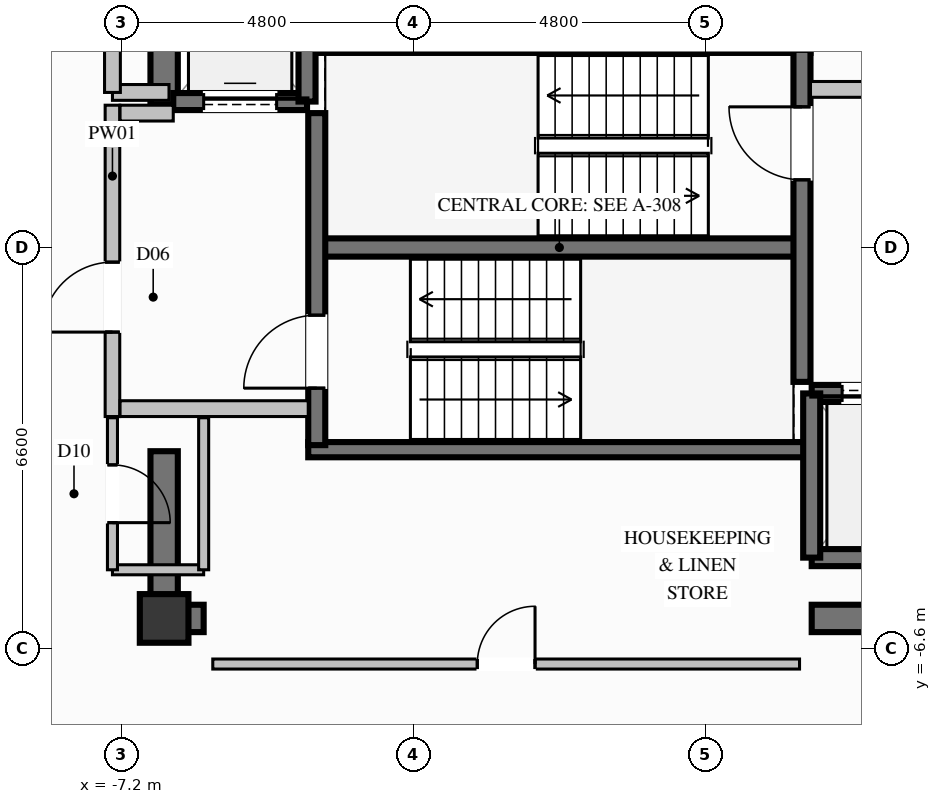
"""IFC4 building model, lengths in metres.
Left out: names, types, materials, properties, quantities, classifications, styles, units other than length and angle.
Written with IfcOpenShell. Run it as: python <this file> out.ifc"""

import sys

from ifc_helpers import new_model, si_unit, direction, frame, frame_2d, origin, origin_2d, place, context, subcontext, project, spatial, rectangle, extrude, element, fill, save


model = new_model("IFC4")
c1 = context("Model", 3, precision=1e-05, world=origin(), true_north=direction((0.0, 1.0)))
c2 = subcontext(c1, "Body", "Model", "MODEL_VIEW")
j1 = project(units=[si_unit("LENGTHUNIT", "METRE"), si_unit("PLANEANGLEUNIT", "RADIAN")], contexts=[c1])
p1 = place(None, origin())
s1 = spatial("IfcSite", under=j1, at=p1, CompositionType="ELEMENT")
p2 = place(p1, origin())
s2 = spatial("IfcBuilding", under=s1, at=p2, CompositionType="ELEMENT")
p3 = place(p2, frame((0.0, 0.0, 270.6)))
s3 = spatial("IfcBuildingStorey", under=s2, at=p3, CompositionType="ELEMENT", Elevation=270.6)
p4 = place(p3, frame((-6.5, -6.1, 0.0), z_axis=(0.0, 0.0, 1.0), x_axis=(1.0, 0.0, 0.0)))
e1 = element("IfcColumn", 1, at=p4, inside=s3, PredefinedType="COLUMN", context=c2, shape_type="SweptSolid", body=[
    extrude(rectangle(XDim=0.8, YDim=0.8, at=origin_2d()), origin(), (0.0, 0.0, 1.0), 3.8),
])
p5 = place(p3, frame((-3.99, 0.0, 0.0), z_axis=(0.0, 0.0, 1.0), x_axis=(1.0, 0.0, 0.0)))
e2 = element("IfcWall", 2, at=p5, inside=s3, PredefinedType="SHEAR", context=c2, shape_type="SweptSolid", body=[
    extrude(rectangle(XDim=7.98, YDim=0.3, at=frame_2d((3.99, 0.0))), origin(), (0.0, 0.0, 1.0), 3.8),
])
for number, where, z_axis, x_axis in (
    (3, (-4.13, -3.325, 0.0), (0.0, 0.0, 1.0), (1.0, 0.0, 0.0)),
    (4, (-4.13, 3.325, 0.0), (0.0, 0.0, 1.0), (1.0, 0.0, 0.0)),
):
    element("IfcWall", number, at=place(p3, frame(where, z_axis=z_axis, x_axis=x_axis)), inside=s3, PredefinedType="SOLIDWALL", context=c2, shape_type="SweptSolid", body=[
        extrude(rectangle(XDim=8.26, YDim=0.25, at=frame_2d((4.13, 0.0))), origin(), (0.0, 0.0, 1.0), 3.8),
    ])
p6 = place(p3, frame((-6.275, -6.1, 0.0), z_axis=(0.0, 0.0, 1.0), x_axis=(1.0, 0.0, 0.0)))
e5 = element("IfcWall", 5, at=p6, inside=s3, PredefinedType="SHEAR", context=c2, shape_type="SweptSolid", body=[
    extrude(rectangle(XDim=0.425, YDim=0.45, at=frame_2d((0.212, 0.0))), origin(), (0.0, 0.0, 1.0), 3.8),
])
p7 = place(p3, frame((4.15, -6.1, 0.0), z_axis=(0.0, 0.0, 1.0), x_axis=(1.0, 0.0, 0.0)))
e6 = element("IfcWall", 6, at=p7, inside=s3, PredefinedType="SHEAR", context=c2, shape_type="SweptSolid", body=[
    extrude(rectangle(XDim=2.125, YDim=0.45, at=frame_2d((1.062, 0.0))), origin(), (0.0, 0.0, 1.0), 3.8),
])
p8 = place(p3, frame((-6.5, 2.35, 0.0), z_axis=(0.0, 0.0, 1.0), x_axis=(0.0, 1.0, 0.0)))
e7 = element("IfcWall", 7, at=p8, inside=s3, PredefinedType="SHEAR", context=c2, shape_type="SweptSolid", body=[
    extrude(rectangle(XDim=3.975, YDim=0.45, at=frame_2d((1.987, 0.0))), origin(), (0.0, 0.0, 1.0), 3.8),
])
p9 = place(p3, frame((-6.5, -6.325, 0.0), z_axis=(0.0, 0.0, 1.0), x_axis=(0.0, 1.0, 0.0)))
e8 = element("IfcWall", 8, at=p9, inside=s3, PredefinedType="SHEAR", context=c2, shape_type="SweptSolid", body=[
    extrude(rectangle(XDim=2.975, YDim=0.45, at=frame_2d((1.487, 0.0))), origin(), (0.0, 0.0, 1.0), 3.8),
])
p10 = place(p3, frame((-6.35, 2.4, 0.0), z_axis=(0.0, 0.0, 1.0), x_axis=(1.0, 0.0, 0.0)))
e9 = element("IfcWall", 9, at=p10, inside=s3, PredefinedType="SOLIDWALL", context=c2, shape_type="SweptSolid", body=[
    extrude(rectangle(XDim=2.2, YDim=0.28, at=frame_2d((1.1, 0.0))), origin(), (0.0, 0.0, 1.0), 3.57),
])
p11 = place(p10, frame((0.5, 0.0, 0.0)))
e10 = element("IfcOpeningElement", 10, at=p11, cuts=e9, PredefinedType="OPENING", context=c2, shape_type="SweptSolid", body=[
    extrude(rectangle(XDim=1.2, YDim=2.2, at=frame_2d((0.6, 1.1))), frame((0.0, 0.15, 0.0), z_axis=(0.0, -1.0, 0.0), x_axis=(1.0, 0.0, 0.0)), (0.0, 0.0, 1.0), 0.3),
])
p12 = place(p3, frame((-4.15, 2.4, 0.0), z_axis=(0.0, 0.0, 1.0), x_axis=(0.0, 1.0, 0.0)))
e11 = element("IfcWall", 11, at=p12, inside=s3, PredefinedType="SOLIDWALL", context=c2, shape_type="SweptSolid", body=[
    extrude(rectangle(XDim=2.7, YDim=0.28, at=frame_2d((1.35, 0.0))), origin(), (0.0, 0.0, 1.0), 3.57),
])
p13 = place(p3, frame((4.15, -5.1, 0.0), z_axis=(0.0, 0.0, 1.0), x_axis=(1.0, 0.0, 0.0)))
e12 = element("IfcWall", 12, at=p13, inside=s3, PredefinedType="SOLIDWALL", context=c2, shape_type="SweptSolid", body=[
    extrude(rectangle(XDim=2.2, YDim=0.28, at=frame_2d((1.1, 0.0))), origin(), (0.0, 0.0, 1.0), 3.57),
])
p14 = place(p3, frame((6.35, -2.4, 0.0), z_axis=(0.0, 0.0, 1.0), x_axis=(-1.0, 0.0, 0.0)))
e13 = element("IfcWall", 13, at=p14, inside=s3, PredefinedType="SOLIDWALL", context=c2, shape_type="SweptSolid", body=[
    extrude(rectangle(XDim=2.2, YDim=0.28, at=frame_2d((1.1, 0.0))), origin(), (0.0, 0.0, 1.0), 3.57),
])
p15 = place(p14, frame((0.5, 0.0, 0.0)))
e14 = element("IfcOpeningElement", 14, at=p15, cuts=e13, PredefinedType="OPENING", context=c2, shape_type="SweptSolid", body=[
    extrude(rectangle(XDim=1.2, YDim=2.2, at=frame_2d((0.6, 1.1))), frame((0.0, 0.15, 0.0), z_axis=(0.0, -1.0, 0.0), x_axis=(1.0, 0.0, 0.0)), (0.0, 0.0, 1.0), 0.3),
])
p16 = place(p3, frame((4.15, -2.4, 0.0), z_axis=(0.0, 0.0, 1.0), x_axis=(0.0, -1.0, 0.0)))
e15 = element("IfcWall", 15, at=p16, inside=s3, PredefinedType="SOLIDWALL", context=c2, shape_type="SweptSolid", body=[
    extrude(rectangle(XDim=2.7, YDim=0.28, at=frame_2d((1.35, 0.0))), origin(), (0.0, 0.0, 1.0), 3.57),
])
p17 = place(p3, frame((-3.99, -3.25, 0.0), z_axis=(0.0, 0.0, 1.0), x_axis=(0.0, 1.0, 0.0)))
e16 = element("IfcWall", 16, at=p17, inside=s3, PredefinedType="SOLIDWALL", context=c2, shape_type="SweptSolid", body=[
    extrude(rectangle(XDim=5.46, YDim=0.28, at=frame_2d((2.73, 0.0))), origin(), (0.0, 0.0, 1.0), 3.57),
])
p18 = place(p17, frame((0.937, 0.0, 0.0)))
e17 = element("IfcOpeningElement", 17, at=p18, cuts=e16, PredefinedType="OPENING", context=c2, shape_type="SweptSolid", body=[
    extrude(rectangle(XDim=1.2, YDim=2.2, at=frame_2d((0.6, 1.1))), frame((0.0, 0.15, 0.0), z_axis=(0.0, -1.0, 0.0), x_axis=(1.0, 0.0, 0.0)), (0.0, 0.0, 1.0), 0.3),
])
p19 = place(p3, frame((3.99, -2.21, 0.0), z_axis=(0.0, 0.0, 1.0), x_axis=(0.0, 1.0, 0.0)))
e18 = element("IfcWall", 18, at=p19, inside=s3, PredefinedType="SOLIDWALL", context=c2, shape_type="SweptSolid", body=[
    extrude(rectangle(XDim=5.46, YDim=0.28, at=frame_2d((2.73, 0.0))), origin(), (0.0, 0.0, 1.0), 3.57),
])
p20 = place(p19, frame((3.323, 0.0, 0.0)))
e19 = element("IfcOpeningElement", 19, at=p20, cuts=e18, PredefinedType="OPENING", context=c2, shape_type="SweptSolid", body=[
    extrude(rectangle(XDim=1.2, YDim=2.2, at=frame_2d((0.6, 1.1))), frame((0.0, 0.15, 0.0), z_axis=(0.0, -1.0, 0.0), x_axis=(1.0, 0.0, 0.0)), (0.0, 0.0, 1.0), 0.3),
])
p21 = place(p3, frame((-7.35, -2.78, 0.0), z_axis=(0.0, 0.0, 1.0), x_axis=(0.0, 1.0, 0.0)))
e20 = element("IfcWall", 20, at=p21, inside=s3, PredefinedType="PARTITIONING", context=c2, shape_type="SweptSolid", body=[
    extrude(rectangle(XDim=5.12, YDim=0.24, at=frame_2d((2.56, 0.0))), origin(), (0.0, 0.0, 1.0), 2.655),
])
p22 = place(p21, frame((1.389, 0.0, 0.0)))
e21 = element("IfcOpeningElement", 21, at=p22, cuts=e20, PredefinedType="OPENING", context=c2, shape_type="SweptSolid", body=[
    extrude(rectangle(XDim=1.15, YDim=2.2, at=frame_2d((0.575, 1.1))), frame((0.0, 0.13, 0.0), z_axis=(0.0, -1.0, 0.0), x_axis=(1.0, 0.0, 0.0)), (0.0, 0.0, 1.0), 0.26),
])
p23 = place(p3, frame((-7.225, -2.65, 0.0), z_axis=(0.0, 0.0, 1.0), x_axis=(1.0, 0.0, 0.0)))
e22 = element("IfcWall", 22, at=p23, inside=s3, PredefinedType="PARTITIONING", context=c2, shape_type="SweptSolid", body=[
    extrude(rectangle(XDim=3.095, YDim=0.26, at=frame_2d((1.548, 0.0))), origin(), (0.0, 0.0, 1.0), 3.57),
])
p24 = place(p3, frame((-7.225, 2.21, 0.0), z_axis=(0.0, 0.0, 1.0), x_axis=(1.0, 0.0, 0.0)))
e23 = element("IfcWall", 23, at=p24, inside=s3, PredefinedType="PARTITIONING", context=c2, shape_type="SweptSolid", body=[
    extrude(rectangle(XDim=0.875, YDim=0.26, at=frame_2d((0.438, 0.0))), origin(), (0.0, 0.0, 1.0), 3.57),
])
p25 = place(p3, frame((4.13, 2.6, 0.0), z_axis=(0.0, 0.0, 1.0), x_axis=(1.0, 0.0, 0.0)))
e24 = element("IfcWall", 24, at=p25, inside=s3, PredefinedType="PARTITIONING", context=c2, shape_type="SweptSolid", body=[
    extrude(rectangle(XDim=3.095, YDim=0.26, at=frame_2d((1.548, 0.0))), origin(), (0.0, 0.0, 1.0), 3.57),
])
p26 = place(p3, frame((-7.35, 2.55, 0.0), z_axis=(0.0, 0.0, 1.0), x_axis=(1.0, 0.0, 0.0)))
e25 = element("IfcWall", 25, at=p26, inside=s3, PredefinedType="PARTITIONING", context=c2, shape_type="SweptSolid", body=[
    extrude(rectangle(XDim=0.93, YDim=0.26, at=frame_2d((0.465, 0.0))), origin(), (0.0, 0.0, 1.0), 3.57),
])
p27 = place(p3, frame((-7.35, 2.55, 0.0), z_axis=(0.0, 0.0, 1.0), x_axis=(0.0, 1.0, 0.0)))
e26 = element("IfcWall", 26, at=p27, inside=s3, PredefinedType="PARTITIONING", context=c2, shape_type="SweptSolid", body=[
    extrude(rectangle(XDim=2.4, YDim=0.26, at=frame_2d((1.2, 0.0))), origin(), (0.0, 0.0, 1.0), 2.655),
])
p28 = place(p27, frame((0.775, 0.0, 0.0)))
e27 = element("IfcOpeningElement", 27, at=p28, cuts=e26, PredefinedType="OPENING", context=c2, shape_type="SweptSolid", body=[
    extrude(rectangle(XDim=0.85, YDim=2.05, at=frame_2d((0.425, 1.025))), frame((0.0, 0.14, 0.0), z_axis=(0.0, -1.0, 0.0), x_axis=(1.0, 0.0, 0.0)), (0.0, 0.0, 1.0), 0.28),
])
p29 = place(p3, frame((-7.35, -5.3, 0.0), z_axis=(0.0, 0.0, 1.0), x_axis=(1.0, 0.0, 0.0)))
e28 = element("IfcWall", 28, at=p29, inside=s3, PredefinedType="PARTITIONING", context=c2, shape_type="SweptSolid", body=[
    extrude(rectangle(XDim=1.5, YDim=0.165, at=frame_2d((0.75, 0.0))), origin(), (0.0, 0.0, 1.0), 2.655),
])
p30 = place(p3, frame((-5.85, -5.3, 0.0), z_axis=(0.0, 0.0, 1.0), x_axis=(0.0, 1.0, 0.0)))
e29 = element("IfcWall", 29, at=p30, inside=s3, PredefinedType="PARTITIONING", context=c2, shape_type="SweptSolid", body=[
    extrude(rectangle(XDim=2.5, YDim=0.165, at=frame_2d((1.25, 0.0))), origin(), (0.0, 0.0, 1.0), 2.655),
])
p31 = place(p3, frame((-7.35, -2.8, 0.0), z_axis=(0.0, 0.0, 1.0), x_axis=(0.0, -1.0, 0.0)))
e30 = element("IfcWall", 30, at=p31, inside=s3, PredefinedType="PARTITIONING", context=c2, shape_type="SweptSolid", body=[
    extrude(rectangle(XDim=2.5, YDim=0.165, at=frame_2d((1.25, 0.0))), origin(), (0.0, 0.0, 1.0), 3.57),
])
p32 = place(p31, frame((0.775, 0.0, 0.0)))
e31 = element("IfcOpeningElement", 31, at=p32, cuts=e30, PredefinedType="OPENING", context=c2, shape_type="SweptSolid", body=[
    extrude(rectangle(XDim=0.95, YDim=2.1, at=frame_2d((0.475, 1.05))), frame((0.0, 0.093, 0.0), z_axis=(0.0, -1.0, 0.0), x_axis=(1.0, 0.0, 0.0)), (0.0, 0.0, 1.0), 0.185),
])
p33 = place(p3, frame((-5.7, -6.85, 0.0), z_axis=(0.0, 0.0, 1.0), x_axis=(1.0, 0.0, 0.0)))
e32 = element("IfcWall", 32, at=p33, inside=s3, PredefinedType="PARTITIONING", context=c2, shape_type="SweptSolid", body=[
    extrude(rectangle(XDim=9.65, YDim=0.165, at=frame_2d((4.825, 0.0))), origin(), (0.0, 0.0, 1.0), 2.655),
])
p34 = place(p33, frame((4.35, 0.0, 0.0)))
e33 = element("IfcOpeningElement", 33, at=p34, cuts=e32, PredefinedType="OPENING", context=c2, shape_type="SweptSolid", body=[
    extrude(rectangle(XDim=0.95, YDim=2.1, at=frame_2d((0.475, 1.05))), frame((0.0, 0.093, 0.0), z_axis=(0.0, -1.0, 0.0), x_axis=(1.0, 0.0, 0.0)), (0.0, 0.0, 1.0), 0.185),
])
p35 = place(p11, origin())
e34 = element("IfcDoor", 34, at=p35, inside=s3, OperationType="SLIDING_TO_LEFT", PredefinedType="DOOR", context=c2, shape_type="SweptSolid", body=[
    extrude(rectangle(XDim=1.2, YDim=2.2, at=frame_2d((0.6, 1.1))), frame((0.0, 0.025, 0.0), z_axis=(0.0, -1.0, 0.0), x_axis=(1.0, 0.0, 0.0)), (0.0, 0.0, 1.0), 0.05),
])
fill(e10, e34)
p36 = place(p15, origin())
e35 = element("IfcDoor", 35, at=p36, inside=s3, OperationType="SLIDING_TO_LEFT", PredefinedType="DOOR", context=c2, shape_type="SweptSolid", body=[
    extrude(rectangle(XDim=1.2, YDim=2.2, at=frame_2d((0.6, 1.1))), frame((0.0, 0.025, 0.0), z_axis=(0.0, -1.0, 0.0), x_axis=(1.0, 0.0, 0.0)), (0.0, 0.0, 1.0), 0.05),
])
fill(e14, e35)
p37 = place(p18, origin())
e36 = element("IfcDoor", 36, at=p37, inside=s3, OperationType="SINGLE_SWING_LEFT", PredefinedType="DOOR", context=c2, shape_type="SweptSolid", body=[
    extrude(rectangle(XDim=1.2, YDim=2.2, at=frame_2d((0.6, 1.1))), frame((0.0, 0.025, 0.0), z_axis=(0.0, -1.0, 0.0), x_axis=(1.0, 0.0, 0.0)), (0.0, 0.0, 1.0), 0.05),
])
fill(e17, e36)
p38 = place(p20, origin())
e37 = element("IfcDoor", 37, at=p38, inside=s3, OperationType="SINGLE_SWING_RIGHT", PredefinedType="DOOR", context=c2, shape_type="SweptSolid", body=[
    extrude(rectangle(XDim=1.2, YDim=2.2, at=frame_2d((0.6, 1.1))), frame((0.0, 0.025, 0.0), z_axis=(0.0, -1.0, 0.0), x_axis=(1.0, 0.0, 0.0)), (0.0, 0.0, 1.0), 0.05),
])
fill(e19, e37)
p39 = place(p22, origin())
e38 = element("IfcDoor", 38, at=p39, inside=s3, OperationType="SINGLE_SWING_LEFT", PredefinedType="DOOR", context=c2, shape_type="SweptSolid", body=[
    extrude(rectangle(XDim=1.15, YDim=2.2, at=frame_2d((0.575, 1.1))), frame((0.0, 0.025, 0.0), z_axis=(0.0, -1.0, 0.0), x_axis=(1.0, 0.0, 0.0)), (0.0, 0.0, 1.0), 0.05),
])
fill(e21, e38)
p40 = place(p32, origin())
e39 = element("IfcDoor", 39, at=p40, inside=s3, OperationType="SINGLE_SWING_RIGHT", PredefinedType="DOOR", context=c2, shape_type="SweptSolid", body=[
    extrude(rectangle(XDim=0.95, YDim=2.1, at=frame_2d((0.475, 1.05))), frame((0.0, 0.025, 0.0), z_axis=(0.0, -1.0, 0.0), x_axis=(1.0, 0.0, 0.0)), (0.0, 0.0, 1.0), 0.05),
])
fill(e31, e39)
p41 = place(p34, origin())
e40 = element("IfcDoor", 40, at=p41, inside=s3, OperationType="SINGLE_SWING_RIGHT", PredefinedType="DOOR", context=c2, shape_type="SweptSolid", body=[
    extrude(rectangle(XDim=0.95, YDim=2.1, at=frame_2d((0.475, 1.05))), frame((0.0, 0.025, 0.0), z_axis=(0.0, -1.0, 0.0), x_axis=(1.0, 0.0, 0.0)), (0.0, 0.0, 1.0), 0.05),
])
fill(e33, e40)
save(model, sys.argv[1])
